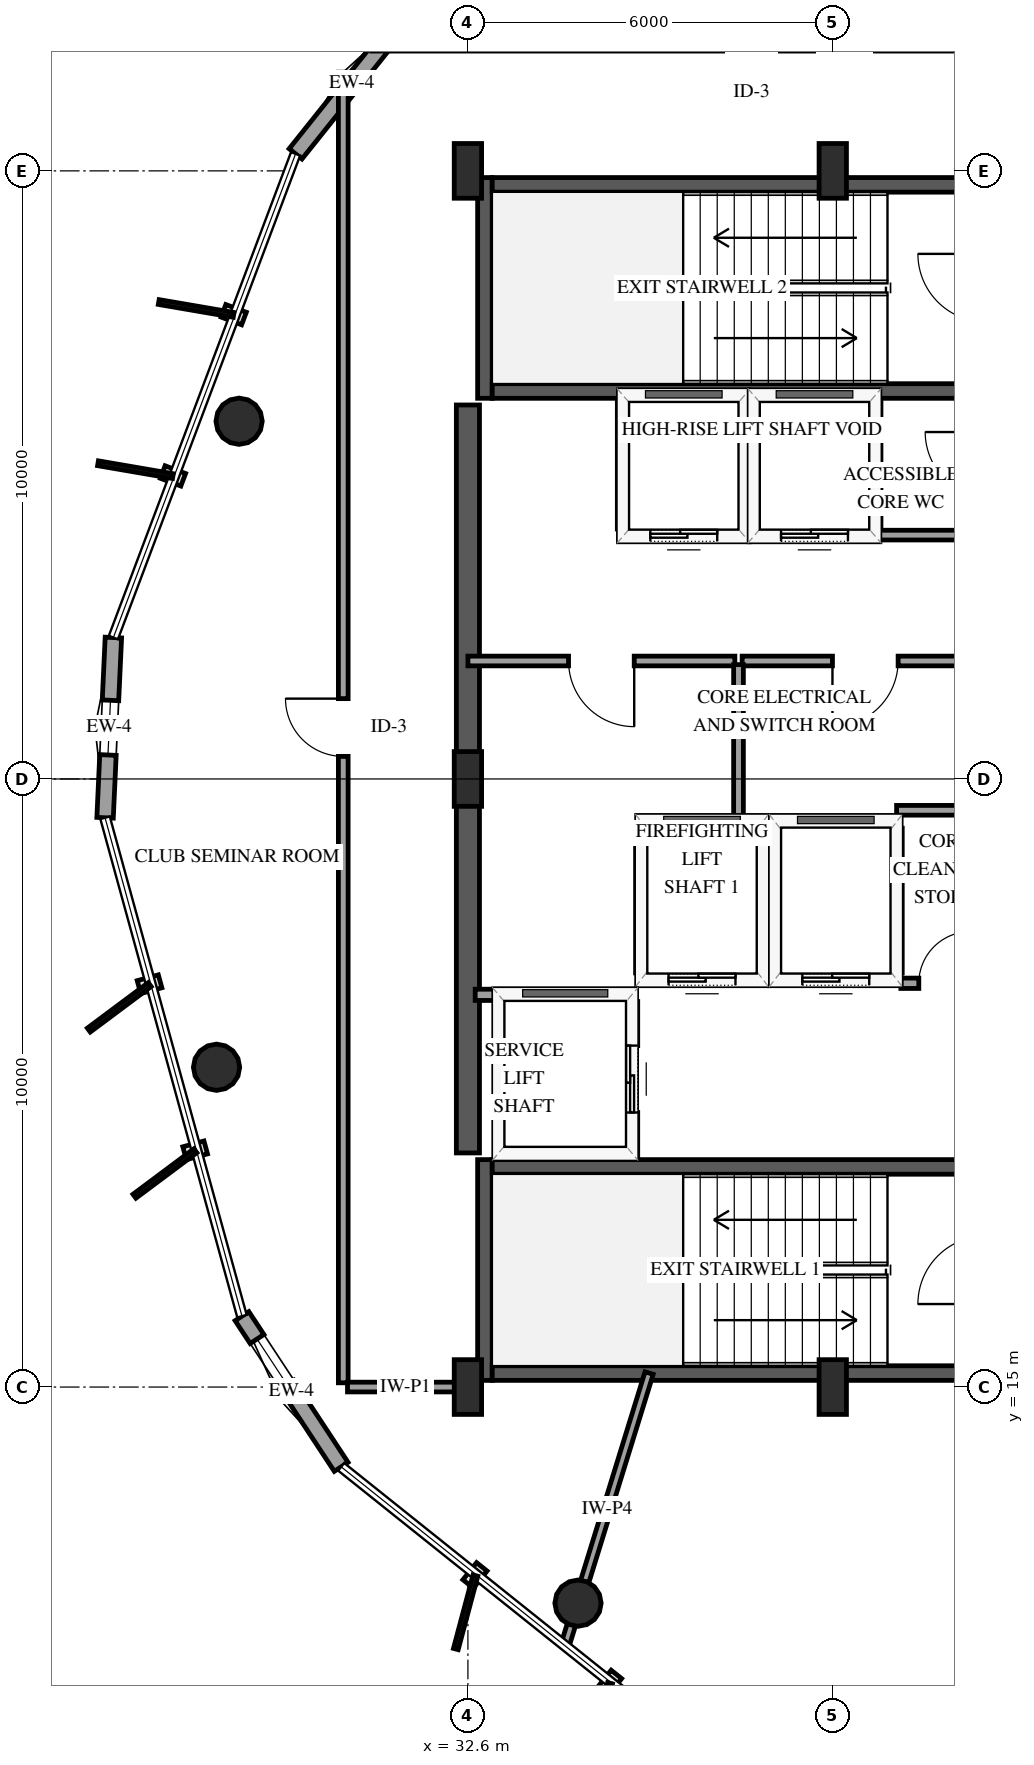
"""IFC4 building model, lengths in metres.
Left out: names, types, materials, properties, quantities, classifications, styles, units other than length and angle.
Written with IfcOpenShell. Run it as: python <this file> out.ifc"""

import sys

from ifc_helpers import new_model, si_unit, direction, frame, frame_2d, origin, origin_2d, place, context, subcontext, project, spatial, rectangle, hollow_circle, extrude, element, fill, save


model = new_model("IFC4")
c1 = context("Model", 3, precision=1e-05, world=origin(), true_north=direction((0.0, 1.0)))
c2 = subcontext(c1, "Body", "Model", "MODEL_VIEW")
j1 = project(units=[si_unit("LENGTHUNIT", "METRE"), si_unit("PLANEANGLEUNIT", "RADIAN")], contexts=[c1])
p1 = place(None, origin())
s1 = spatial("IfcSite", under=j1, at=p1, CompositionType="ELEMENT")
p2 = place(p1, origin())
s2 = spatial("IfcBuilding", under=s1, at=p2, CompositionType="ELEMENT")
p3 = place(p2, frame((0.0, 0.0, 288.55)))
s3 = spatial("IfcBuildingStorey", under=s2, at=p3, CompositionType="ELEMENT", Elevation=288.55)
p4 = place(p3, frame((32.88, 15.11, 0.0), z_axis=(0.0, 0.0, 1.0), x_axis=(0.0, 1.0, 0.0)))
e1 = element("IfcWall", 1, at=p4, inside=s3, PredefinedType="SHEAR", context=c2, shape_type="SweptSolid", body=[
    extrude(rectangle(XDim=3.63, YDim=0.24, at=frame_2d((1.815, 0.0))), origin(), (0.0, 0.0, 1.0), 4.5),
])
for number, where, z_axis, x_axis in (
    (2, (33.0, 15.23, 0.0), (0.0, 0.0, 1.0), (1.0, 0.0, 0.0)),
    (3, (33.0, 18.62, 0.0), (0.0, 0.0, 1.0), (1.0, 0.0, 0.0)),
):
    element("IfcWall", number, at=place(p3, frame(where, z_axis=z_axis, x_axis=x_axis)), inside=s3, PredefinedType="SHEAR", context=c2, shape_type="SweptSolid", body=[
        extrude(rectangle(XDim=8.0, YDim=0.24, at=frame_2d((4.0, 0.0))), origin(), (0.0, 0.0, 1.0), 4.5),
    ])
p5 = place(p3, frame((32.88, 31.26, 0.0), z_axis=(0.0, 0.0, 1.0), x_axis=(0.0, 1.0, 0.0)))
e4 = element("IfcWall", 4, at=p5, inside=s3, PredefinedType="SHEAR", context=c2, shape_type="SweptSolid", body=[
    extrude(rectangle(XDim=3.63, YDim=0.24, at=frame_2d((1.815, 0.0))), origin(), (0.0, 0.0, 1.0), 4.5),
])
for number, where, z_axis, x_axis in (
    (5, (33.0, 31.38, 0.0), (0.0, 0.0, 1.0), (1.0, 0.0, 0.0)),
    (6, (33.0, 34.77, 0.0), (0.0, 0.0, 1.0), (1.0, 0.0, 0.0)),
):
    element("IfcWall", number, at=place(p3, frame(where, z_axis=z_axis, x_axis=x_axis)), inside=s3, PredefinedType="SHEAR", context=c2, shape_type="SweptSolid", body=[
        extrude(rectangle(XDim=8.0, YDim=0.24, at=frame_2d((4.0, 0.0))), origin(), (0.0, 0.0, 1.0), 4.5),
    ])
p6 = place(p3, frame((32.6, 18.85, 0.0), z_axis=(0.0, 0.0, 1.0), x_axis=(0.0, 1.0, 0.0)))
e7 = element("IfcWall", 7, at=p6, inside=s3, PredefinedType="SHEAR", context=c2, shape_type="SweptSolid", body=[
    extrude(rectangle(XDim=12.3, YDim=0.38, at=frame_2d((6.15, 0.0))), origin(), (0.0, 0.0, 1.0), 4.5),
])
for number, where, z_axis, x_axis in (
    (8, (32.6, 15.0, 0.0), (0.0, 0.0, 1.0), (1.0, 0.0, 0.0)),
    (9, (32.6, 25.0, 0.0), (0.0, 0.0, 1.0), (1.0, 0.0, 0.0)),
    (10, (32.6, 35.0, 0.0), (0.0, 0.0, 1.0), (1.0, 0.0, 0.0)),
    (11, (38.6, 15.0, 0.0), (0.0, 0.0, 1.0), (1.0, 0.0, 0.0)),
    (12, (38.6, 35.0, 0.0), (0.0, 0.0, 1.0), (1.0, 0.0, 0.0)),
):
    element("IfcColumn", number, at=place(p3, frame(where, z_axis=z_axis, x_axis=x_axis)), inside=s3, PredefinedType="PILASTER", context=c2, shape_type="SweptSolid", body=[
        extrude(rectangle(XDim=0.45, YDim=0.9, at=origin_2d()), origin(), (0.0, 0.0, 1.0), 4.195),
    ])
for number, where, z_axis, x_axis in (
    (13, (28.837, 30.883, 0.0), (0.0, 0.0, 1.0), (1.0, 0.0, 0.0)),
    (14, (28.466, 20.259, 0.0), (0.0, 0.0, 1.0), (1.0, 0.0, 0.0)),
    (15, (34.411, 11.446, 0.0), (0.0, 0.0, 1.0), (1.0, 0.0, 0.0)),
):
    element("IfcColumn", number, at=place(p3, frame(where, z_axis=z_axis, x_axis=x_axis)), inside=s3, PredefinedType="COLUMN", context=c2, shape_type="SweptSolid", body=[
        extrude(hollow_circle(Radius=0.381, WallThickness=0.025, at=origin_2d()), origin(), (0.0, 0.0, 1.0), 4.165),
    ])
p7 = place(p3, frame((31.618, 37.597, 0.0), z_axis=(0.0, 0.0, 1.0), x_axis=(-0.624444087009, -0.781069511759, 0.0)))
e16 = element("IfcWall", 16, at=p7, inside=s3, PredefinedType="SOLIDWALL", context=c2, shape_type="SweptSolid", body=[
    extrude(rectangle(XDim=2.966, YDim=0.27, at=frame_2d((1.483, 0.0))), origin(), (0.0, 0.0, 1.0), 3.574),
])
p8 = place(p3, frame((26.77, 27.325, 0.0), z_axis=(0.0, 0.0, 1.0), x_axis=(-0.046087078481, -0.998937426067, 0.0)))
e17 = element("IfcWall", 17, at=p8, inside=s3, PredefinedType="SOLIDWALL", context=c2, shape_type="SweptSolid", body=[
    extrude(rectangle(XDim=2.967, YDim=0.27, at=frame_2d((1.483, 0.0))), origin(), (0.0, 0.0, 1.0), 3.574),
])
p9 = place(p8, frame((1.033, 0.0, 0.75)))
e18 = element("IfcOpeningElement", 18, at=p9, cuts=e17, PredefinedType="OPENING", context=c2, shape_type="SweptSolid", body=[
    extrude(rectangle(XDim=0.9, YDim=1.5, at=frame_2d((0.45, 0.75))), frame((0.0, 0.145, 0.0), z_axis=(0.0, -1.0, 0.0), x_axis=(1.0, 0.0, 0.0)), (0.0, 0.0, 1.0), 0.29),
])
p10 = place(p3, frame((28.885, 16.166, 0.0), z_axis=(0.0, 0.0, 1.0), x_axis=(0.549905162687, -0.835227102081, 0.0)))
e19 = element("IfcWall", 19, at=p10, inside=s3, PredefinedType="SOLIDWALL", context=c2, shape_type="SweptSolid", body=[
    extrude(rectangle(XDim=2.967, YDim=0.27, at=frame_2d((1.483, 0.0))), origin(), (0.0, 0.0, 1.0), 3.574),
])
p11 = place(p10, frame((0.45, 0.0, 0.75)))
e20 = element("IfcOpeningElement", 20, at=p11, cuts=e19, PredefinedType="OPENING", context=c2, shape_type="SweptSolid", body=[
    extrude(rectangle(XDim=0.9, YDim=1.5, at=frame_2d((0.45, 0.75))), frame((0.0, 0.145, 0.0), z_axis=(0.0, -1.0, 0.0), x_axis=(1.0, 0.0, 0.0)), (0.0, 0.0, 1.0), 0.29),
])
p12 = place(p3, frame((35.45, 21.7, 0.0), z_axis=(0.0, 0.0, 1.0), x_axis=(1.0, 0.0, 0.0)))
e21 = element("IfcWall", 21, at=p12, inside=s3, PredefinedType="SOLIDWALL", context=c2, shape_type="SweptSolid", body=[
    extrude(rectangle(XDim=2.0, YDim=0.185, at=frame_2d((1.0, 0.0))), origin(), (0.0, 0.0, 1.0), 4.195),
])
p13 = place(p12, frame((0.45, 0.0, 0.0)))
e22 = element("IfcOpeningElement", 22, at=p13, cuts=e21, PredefinedType="OPENING", context=c2, shape_type="SweptSolid", body=[
    extrude(rectangle(XDim=1.1, YDim=2.15, at=frame_2d((0.55, 1.075))), frame((0.0, 0.103, 0.0), z_axis=(0.0, -1.0, 0.0), x_axis=(1.0, 0.0, 0.0)), (0.0, 0.0, 1.0), 0.205),
])
p14 = place(p3, frame((35.45, 24.3, 0.0), z_axis=(0.0, 0.0, 1.0), x_axis=(1.0, 0.0, 0.0)))
e23 = element("IfcWall", 23, at=p14, inside=s3, PredefinedType="SOLIDWALL", context=c2, shape_type="SweptSolid", body=[
    extrude(rectangle(XDim=2.0, YDim=0.185, at=frame_2d((1.0, 0.0))), origin(), (0.0, 0.0, 1.0), 4.195),
])
for number, where, z_axis, x_axis in (
    (24, (35.45, 21.81, 0.0), (0.0, 0.0, 1.0), (0.0, 1.0, 0.0)),
    (25, (37.45, 21.81, 0.0), (0.0, 0.0, 1.0), (0.0, 1.0, 0.0)),
):
    element("IfcWall", number, at=place(p3, frame(where, z_axis=z_axis, x_axis=x_axis)), inside=s3, PredefinedType="SOLIDWALL", context=c2, shape_type="SweptSolid", body=[
        extrude(rectangle(XDim=2.38, YDim=0.185, at=frame_2d((1.19, 0.0))), origin(), (0.0, 0.0, 1.0), 4.195),
    ])
p15 = place(p3, frame((37.65, 21.7, 0.0), z_axis=(0.0, 0.0, 1.0), x_axis=(1.0, 0.0, 0.0)))
e26 = element("IfcWall", 26, at=p15, inside=s3, PredefinedType="SOLIDWALL", context=c2, shape_type="SweptSolid", body=[
    extrude(rectangle(XDim=2.0, YDim=0.185, at=frame_2d((1.0, 0.0))), origin(), (0.0, 0.0, 1.0), 4.195),
])
p16 = place(p15, frame((0.45, 0.0, 0.0)))
e27 = element("IfcOpeningElement", 27, at=p16, cuts=e26, PredefinedType="OPENING", context=c2, shape_type="SweptSolid", body=[
    extrude(rectangle(XDim=1.1, YDim=2.15, at=frame_2d((0.55, 1.075))), frame((0.0, 0.103, 0.0), z_axis=(0.0, -1.0, 0.0), x_axis=(1.0, 0.0, 0.0)), (0.0, 0.0, 1.0), 0.205),
])
p17 = place(p3, frame((37.65, 24.3, 0.0), z_axis=(0.0, 0.0, 1.0), x_axis=(1.0, 0.0, 0.0)))
e28 = element("IfcWall", 28, at=p17, inside=s3, PredefinedType="SOLIDWALL", context=c2, shape_type="SweptSolid", body=[
    extrude(rectangle(XDim=2.0, YDim=0.185, at=frame_2d((1.0, 0.0))), origin(), (0.0, 0.0, 1.0), 4.195),
])
p18 = place(p3, frame((39.65, 21.81, 0.0), z_axis=(0.0, 0.0, 1.0), x_axis=(0.0, 1.0, 0.0)))
e29 = element("IfcWall", 29, at=p18, inside=s3, PredefinedType="SOLIDWALL", context=c2, shape_type="SweptSolid", body=[
    extrude(rectangle(XDim=2.38, YDim=0.185, at=frame_2d((1.19, 0.0))), origin(), (0.0, 0.0, 1.0), 4.195),
])
p19 = place(p3, frame((32.72, 21.45, 0.0), z_axis=(0.0, 0.0, 1.0), x_axis=(1.0, 0.0, 0.0)))
e30 = element("IfcWall", 30, at=p19, inside=s3, PredefinedType="SOLIDWALL", context=c2, shape_type="SweptSolid", body=[
    extrude(rectangle(XDim=2.58, YDim=0.185, at=frame_2d((1.29, 0.0))), origin(), (0.0, 0.0, 1.0), 4.195),
])
p20 = place(p3, frame((35.3, 18.79, 0.0), z_axis=(0.0, 0.0, 1.0), x_axis=(0.0, 1.0, 0.0)))
e31 = element("IfcWall", 31, at=p20, inside=s3, PredefinedType="SOLIDWALL", context=c2, shape_type="SweptSolid", body=[
    extrude(rectangle(XDim=2.55, YDim=0.185, at=frame_2d((1.275, 0.0))), origin(), (0.0, 0.0, 1.0), 4.195),
])
p21 = place(p20, frame((0.725, 0.0, 0.0)))
e32 = element("IfcOpeningElement", 32, at=p21, cuts=e31, PredefinedType="OPENING", context=c2, shape_type="SweptSolid", body=[
    extrude(rectangle(XDim=1.1, YDim=2.15, at=frame_2d((0.55, 1.075))), frame((0.0, 0.103, 0.0), z_axis=(0.0, -1.0, 0.0), x_axis=(1.0, 0.0, 0.0)), (0.0, 0.0, 1.0), 0.205),
])
p22 = place(p3, frame((35.15, 29.0, 0.0), z_axis=(0.0, 0.0, 1.0), x_axis=(1.0, 0.0, 0.0)))
e33 = element("IfcWall", 33, at=p22, inside=s3, PredefinedType="SOLIDWALL", context=c2, shape_type="SweptSolid", body=[
    extrude(rectangle(XDim=2.0, YDim=0.185, at=frame_2d((1.0, 0.0))), origin(), (0.0, 0.0, 1.0), 4.195),
])
p23 = place(p22, frame((0.45, 0.0, 0.0)))
e34 = element("IfcOpeningElement", 34, at=p23, cuts=e33, PredefinedType="OPENING", context=c2, shape_type="SweptSolid", body=[
    extrude(rectangle(XDim=1.1, YDim=2.15, at=frame_2d((0.55, 1.075))), frame((0.0, 0.103, 0.0), z_axis=(0.0, -1.0, 0.0), x_axis=(1.0, 0.0, 0.0)), (0.0, 0.0, 1.0), 0.205),
])
for number, where, z_axis, x_axis in (
    (35, (35.15, 29.11, 0.0), (0.0, 0.0, 1.0), (0.0, 1.0, 0.0)),
    (36, (37.15, 29.11, 0.0), (0.0, 0.0, 1.0), (0.0, 1.0, 0.0)),
):
    element("IfcWall", number, at=place(p3, frame(where, z_axis=z_axis, x_axis=x_axis)), inside=s3, PredefinedType="SOLIDWALL", context=c2, shape_type="SweptSolid", body=[
        extrude(rectangle(XDim=2.1, YDim=0.185, at=frame_2d((1.05, 0.0))), origin(), (0.0, 0.0, 1.0), 4.195),
    ])
p24 = place(p3, frame((37.3, 29.0, 0.0), z_axis=(0.0, 0.0, 1.0), x_axis=(1.0, 0.0, 0.0)))
e37 = element("IfcWall", 37, at=p24, inside=s3, PredefinedType="SOLIDWALL", context=c2, shape_type="SweptSolid", body=[
    extrude(rectangle(XDim=2.0, YDim=0.185, at=frame_2d((1.0, 0.0))), origin(), (0.0, 0.0, 1.0), 4.195),
])
p25 = place(p24, frame((0.45, 0.0, 0.0)))
e38 = element("IfcOpeningElement", 38, at=p25, cuts=e37, PredefinedType="OPENING", context=c2, shape_type="SweptSolid", body=[
    extrude(rectangle(XDim=1.1, YDim=2.15, at=frame_2d((0.55, 1.075))), frame((0.0, 0.103, 0.0), z_axis=(0.0, -1.0, 0.0), x_axis=(1.0, 0.0, 0.0)), (0.0, 0.0, 1.0), 0.205),
])
p26 = place(p3, frame((39.3, 29.11, 0.0), z_axis=(0.0, 0.0, 1.0), x_axis=(0.0, 1.0, 0.0)))
e39 = element("IfcWall", 39, at=p26, inside=s3, PredefinedType="SOLIDWALL", context=c2, shape_type="SweptSolid", body=[
    extrude(rectangle(XDim=2.1, YDim=0.185, at=frame_2d((1.05, 0.0))), origin(), (0.0, 0.0, 1.0), 4.195),
])
p27 = place(p3, frame((30.55, 15.07, 0.0), z_axis=(0.0, 0.0, 1.0), x_axis=(0.0, 1.0, 0.0)))
e40 = element("IfcWall", 40, at=p27, inside=s3, PredefinedType="PARTITIONING", context=c2, shape_type="SweptSolid", body=[
    extrude(rectangle(XDim=21.553, YDim=0.16, at=frame_2d((10.776, 0.0))), origin(), (0.0, 0.0, 1.0), 2.583),
])
p28 = place(p27, frame((10.301, 0.0, 0.0)))
e41 = element("IfcOpeningElement", 41, at=p28, cuts=e40, PredefinedType="OPENING", context=c2, shape_type="SweptSolid", body=[
    extrude(rectangle(XDim=0.95, YDim=2.15, at=frame_2d((0.475, 1.075))), frame((0.0, 0.09, 0.0), z_axis=(0.0, -1.0, 0.0), x_axis=(1.0, 0.0, 0.0)), (0.0, 0.0, 1.0), 0.18),
])
p29 = place(p3, frame((35.58, 15.23, 0.0), z_axis=(0.0, 0.0, 1.0), x_axis=(-0.295186233407, -0.955439735204, 0.0)))
e42 = element("IfcWall", 42, at=p29, inside=s3, PredefinedType="PARTITIONING", context=c2, shape_type="SweptSolid", body=[
    extrude(rectangle(XDim=4.692, YDim=0.14, at=frame_2d((2.346, 0.0))), origin(), (0.0, 0.0, 1.0), 2.485),
])
p30 = place(p3, frame((36.99, 26.94, 0.0), z_axis=(0.0, 0.0, 1.0), x_axis=(-1.0, 0.0, 0.0)))
e43 = element("IfcWall", 43, at=p30, inside=s3, PredefinedType="PARTITIONING", context=c2, shape_type="SweptSolid", body=[
    extrude(rectangle(XDim=4.39, YDim=0.16, at=frame_2d((2.195, 0.0))), origin(), (0.0, 0.0, 1.0), 4.195),
])
p31 = place(p30, frame((1.655, 0.0, 0.0)))
e44 = element("IfcOpeningElement", 44, at=p31, cuts=e43, PredefinedType="OPENING", context=c2, shape_type="SweptSolid", body=[
    extrude(rectangle(XDim=1.08, YDim=2.15, at=frame_2d((0.54, 1.075))), frame((0.0, 0.09, 0.0), z_axis=(0.0, -1.0, 0.0), x_axis=(1.0, 0.0, 0.0)), (0.0, 0.0, 1.0), 0.18),
])
p32 = place(p3, frame((41.16, 26.94, 0.0), z_axis=(0.0, 0.0, 1.0), x_axis=(-1.0, 0.0, 0.0)))
e45 = element("IfcWall", 45, at=p32, inside=s3, PredefinedType="PARTITIONING", context=c2, shape_type="SweptSolid", body=[
    extrude(rectangle(XDim=4.05, YDim=0.16, at=frame_2d((2.025, 0.0))), origin(), (0.0, 0.0, 1.0), 4.195),
])
p33 = place(p32, frame((1.485, 0.0, 0.0)))
e46 = element("IfcOpeningElement", 46, at=p33, cuts=e45, PredefinedType="OPENING", context=c2, shape_type="SweptSolid", body=[
    extrude(rectangle(XDim=1.08, YDim=2.15, at=frame_2d((0.54, 1.075))), frame((0.0, 0.09, 0.0), z_axis=(0.0, -1.0, 0.0), x_axis=(1.0, 0.0, 0.0)), (0.0, 0.0, 1.0), 0.18),
])
p34 = place(p3, frame((37.05, 26.88, 0.0), z_axis=(0.0, 0.0, 1.0), x_axis=(0.0, -1.0, 0.0)))
e47 = element("IfcWall", 47, at=p34, inside=s3, PredefinedType="PARTITIONING", context=c2, shape_type="SweptSolid", body=[
    extrude(rectangle(XDim=2.58, YDim=0.16, at=frame_2d((1.29, 0.0))), origin(), (0.0, 0.0, 1.0), 4.195),
])
p35 = place(p3, frame((32.53, 15.0, 0.0), z_axis=(0.0, 0.0, 1.0), x_axis=(-1.0, 0.0, 0.0)))
e48 = element("IfcWall", 48, at=p35, inside=s3, PredefinedType="PARTITIONING", context=c2, shape_type="SweptSolid", body=[
    extrude(rectangle(XDim=1.91, YDim=0.16, at=frame_2d((0.955, 0.0))), origin(), (0.0, 0.0, 1.0), 4.195),
])
p36 = place(p3, frame((39.3, 29.01, 0.0), z_axis=(0.0, 0.0, 1.0), x_axis=(1.0, 0.0, 0.0)))
e49 = element("IfcWall", 49, at=p36, inside=s3, PredefinedType="PARTITIONING", context=c2, shape_type="SweptSolid", body=[
    extrude(rectangle(XDim=1.86, YDim=0.16, at=frame_2d((0.93, 0.0))), origin(), (0.0, 0.0, 1.0), 4.195),
])
p37 = place(p3, frame((39.65, 24.485, 0.0), z_axis=(0.0, 0.0, 1.0), x_axis=(1.0, 0.0, 0.0)))
e50 = element("IfcWall", 50, at=p37, inside=s3, PredefinedType="PARTITIONING", context=c2, shape_type="SweptSolid", body=[
    extrude(rectangle(XDim=1.51, YDim=0.16, at=frame_2d((0.755, 0.0))), origin(), (0.0, 0.0, 1.0), 4.195),
])
p38 = place(p3, frame((39.72, 21.64, 0.0), z_axis=(0.0, 0.0, 1.0), x_axis=(1.0, 0.0, 0.0)))
e51 = element("IfcWall", 51, at=p38, inside=s3, PredefinedType="PARTITIONING", context=c2, shape_type="SweptSolid", body=[
    extrude(rectangle(XDim=1.44, YDim=0.17, at=frame_2d((0.72, 0.0))), origin(), (0.0, 0.0, 1.0), 4.195),
])
p39 = place(p38, frame((0.295, 0.0, 0.0)))
e52 = element("IfcOpeningElement", 52, at=p39, cuts=e51, PredefinedType="OPENING", context=c2, shape_type="SweptSolid", body=[
    extrude(rectangle(XDim=0.85, YDim=2.1, at=frame_2d((0.425, 1.05))), frame((0.0, 0.095, 0.0), z_axis=(0.0, -1.0, 0.0), x_axis=(1.0, 0.0, 0.0)), (0.0, 0.0, 1.0), 0.19),
])
p40 = place(p9, origin())
e53 = element("IfcWindow", 53, at=p40, inside=s3, PartitioningType="SINGLE_PANEL", PredefinedType="WINDOW", context=c2, shape_type="SweptSolid", body=[
    extrude(rectangle(XDim=0.9, YDim=1.5, at=frame_2d((0.45, 0.75))), frame((0.0, 0.03, 0.0), z_axis=(0.0, -1.0, 0.0), x_axis=(1.0, 0.0, 0.0)), (0.0, 0.0, 1.0), 0.06),
])
fill(e18, e53)
p41 = place(p11, origin())
e54 = element("IfcWindow", 54, at=p41, inside=s3, PartitioningType="SINGLE_PANEL", PredefinedType="WINDOW", context=c2, shape_type="SweptSolid", body=[
    extrude(rectangle(XDim=0.9, YDim=1.5, at=frame_2d((0.45, 0.75))), frame((0.0, 0.03, 0.0), z_axis=(0.0, -1.0, 0.0), x_axis=(1.0, 0.0, 0.0)), (0.0, 0.0, 1.0), 0.06),
])
fill(e20, e54)
p42 = place(p13, origin())
e55 = element("IfcDoor", 55, at=p42, inside=s3, OperationType="SLIDING_TO_LEFT", PredefinedType="DOOR", context=c2, shape_type="SweptSolid", body=[
    extrude(rectangle(XDim=1.1, YDim=2.15, at=frame_2d((0.55, 1.075))), frame((0.0, 0.025, 0.0), z_axis=(0.0, -1.0, 0.0), x_axis=(1.0, 0.0, 0.0)), (0.0, 0.0, 1.0), 0.05),
])
fill(e22, e55)
p43 = place(p16, origin())
e56 = element("IfcDoor", 56, at=p43, inside=s3, OperationType="SLIDING_TO_LEFT", PredefinedType="DOOR", context=c2, shape_type="SweptSolid", body=[
    extrude(rectangle(XDim=1.1, YDim=2.15, at=frame_2d((0.55, 1.075))), frame((0.0, 0.025, 0.0), z_axis=(0.0, -1.0, 0.0), x_axis=(1.0, 0.0, 0.0)), (0.0, 0.0, 1.0), 0.05),
])
fill(e27, e56)
p44 = place(p21, origin())
e57 = element("IfcDoor", 57, at=p44, inside=s3, OperationType="SLIDING_TO_LEFT", PredefinedType="DOOR", context=c2, shape_type="SweptSolid", body=[
    extrude(rectangle(XDim=1.1, YDim=2.15, at=frame_2d((0.55, 1.075))), frame((0.0, 0.025, 0.0), z_axis=(0.0, -1.0, 0.0), x_axis=(1.0, 0.0, 0.0)), (0.0, 0.0, 1.0), 0.05),
])
fill(e32, e57)
p45 = place(p23, origin())
e58 = element("IfcDoor", 58, at=p45, inside=s3, OperationType="SLIDING_TO_LEFT", PredefinedType="DOOR", context=c2, shape_type="SweptSolid", body=[
    extrude(rectangle(XDim=1.1, YDim=2.15, at=frame_2d((0.55, 1.075))), frame((0.0, 0.025, 0.0), z_axis=(0.0, -1.0, 0.0), x_axis=(1.0, 0.0, 0.0)), (0.0, 0.0, 1.0), 0.05),
])
fill(e34, e58)
p46 = place(p25, origin())
e59 = element("IfcDoor", 59, at=p46, inside=s3, OperationType="SLIDING_TO_LEFT", PredefinedType="DOOR", context=c2, shape_type="SweptSolid", body=[
    extrude(rectangle(XDim=1.1, YDim=2.15, at=frame_2d((0.55, 1.075))), frame((0.0, 0.025, 0.0), z_axis=(0.0, -1.0, 0.0), x_axis=(1.0, 0.0, 0.0)), (0.0, 0.0, 1.0), 0.05),
])
fill(e38, e59)
p47 = place(p28, origin())
e60 = element("IfcDoor", 60, at=p47, inside=s3, OperationType="SINGLE_SWING_RIGHT", PredefinedType="DOOR", context=c2, shape_type="SweptSolid", body=[
    extrude(rectangle(XDim=0.95, YDim=2.15, at=frame_2d((0.475, 1.075))), frame((0.0, 0.025, 0.0), z_axis=(0.0, -1.0, 0.0), x_axis=(1.0, 0.0, 0.0)), (0.0, 0.0, 1.0), 0.05),
])
fill(e41, e60)
p48 = place(p31, origin())
e61 = element("IfcDoor", 61, at=p48, inside=s3, OperationType="SINGLE_SWING_LEFT", PredefinedType="DOOR", context=c2, shape_type="SweptSolid", body=[
    extrude(rectangle(XDim=1.08, YDim=2.15, at=frame_2d((0.54, 1.075))), frame((0.0, 0.025, 0.0), z_axis=(0.0, -1.0, 0.0), x_axis=(1.0, 0.0, 0.0)), (0.0, 0.0, 1.0), 0.05),
])
fill(e44, e61)
p49 = place(p33, origin())
e62 = element("IfcDoor", 62, at=p49, inside=s3, OperationType="SINGLE_SWING_RIGHT", PredefinedType="DOOR", context=c2, shape_type="SweptSolid", body=[
    extrude(rectangle(XDim=1.08, YDim=2.15, at=frame_2d((0.54, 1.075))), frame((0.0, 0.025, 0.0), z_axis=(0.0, -1.0, 0.0), x_axis=(1.0, 0.0, 0.0)), (0.0, 0.0, 1.0), 0.05),
])
fill(e46, e62)
p50 = place(p39, origin())
e63 = element("IfcDoor", 63, at=p50, inside=s3, OperationType="SINGLE_SWING_RIGHT", PredefinedType="DOOR", context=c2, shape_type="SweptSolid", body=[
    extrude(rectangle(XDim=0.85, YDim=2.1, at=frame_2d((0.425, 1.05))), frame((0.0, 0.025, 0.0), z_axis=(0.0, -1.0, 0.0), x_axis=(1.0, 0.0, 0.0)), (0.0, 0.0, 1.0), 0.05),
])
fill(e52, e63)
save(model, sys.argv[1])
